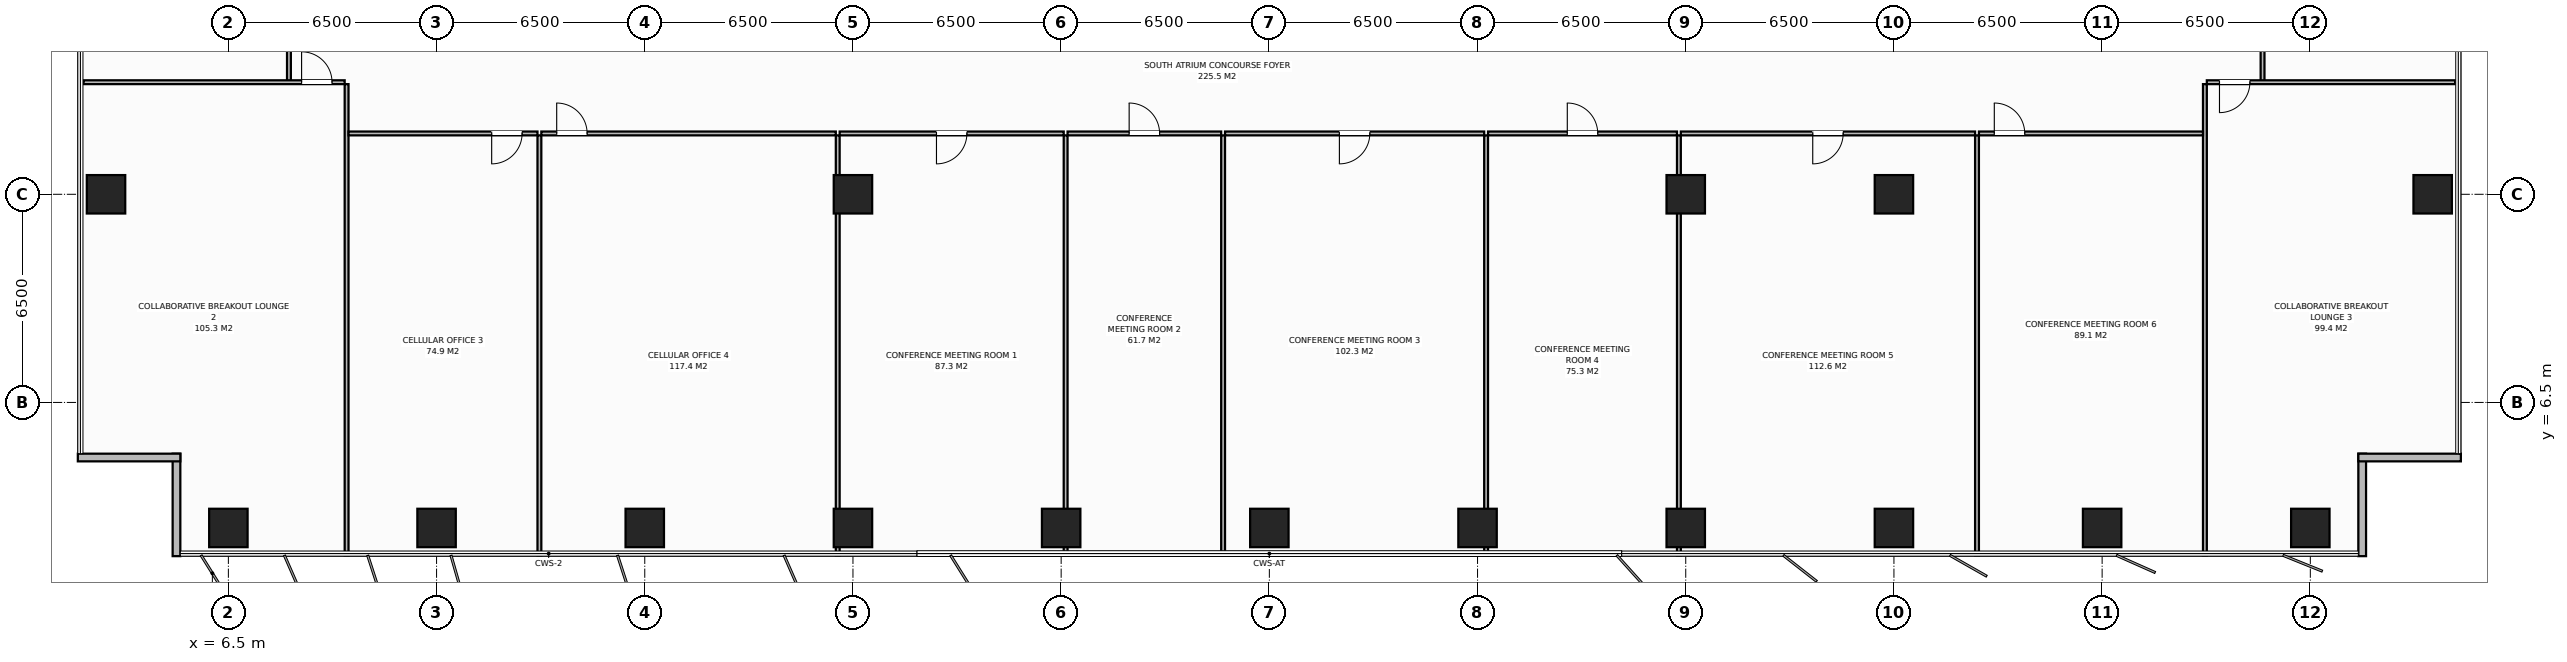
"""IFC4 building model, lengths in metres.
Left out: names, types, materials, properties, quantities, classifications, styles, units other than length and angle.
Written with IfcOpenShell. Run it as: python <this file> out.ifc"""

import sys

from ifc_helpers import new_model, si_unit, direction, frame, frame_2d, origin, origin_2d, place, context, subcontext, project, spatial, rectangle, extrude, element, fill, save


model = new_model("IFC4")
c1 = context("Model", 3, precision=1e-05, world=origin(), true_north=direction((0.0, 1.0)))
c2 = subcontext(c1, "Body", "Model", "MODEL_VIEW")
j1 = project(units=[si_unit("LENGTHUNIT", "METRE"), si_unit("PLANEANGLEUNIT", "RADIAN")], contexts=[c1])
p1 = place(None, origin())
s1 = spatial("IfcSite", under=j1, at=p1, CompositionType="ELEMENT")
p2 = place(p1, origin())
s2 = spatial("IfcBuilding", under=s1, at=p2, CompositionType="ELEMENT")
p3 = place(p2, frame((0.0, 0.0, 131.6)))
s3 = spatial("IfcBuildingStorey", under=s2, at=p3, CompositionType="ELEMENT", Elevation=131.6)
for number, where, z_axis, x_axis in (
    (1, (58.5, 13.0, 0.0), (0.0, 0.0, 1.0), (1.0, 0.0, 0.0)),
    (2, (26.0, 13.0, 0.0), (0.0, 0.0, 1.0), (1.0, 0.0, 0.0)),
    (3, (52.0, 13.0, 0.0), (0.0, 0.0, 1.0), (1.0, 0.0, 0.0)),
    (4, (6.5, 2.58, 0.0), (0.0, 0.0, 1.0), (1.0, 0.0, 0.0)),
    (5, (13.0, 2.58, 0.0), (0.0, 0.0, 1.0), (1.0, 0.0, 0.0)),
    (6, (19.5, 2.58, 0.0), (0.0, 0.0, 1.0), (1.0, 0.0, 0.0)),
    (7, (26.0, 2.58, 0.0), (0.0, 0.0, 1.0), (1.0, 0.0, 0.0)),
    (8, (32.5, 2.58, 0.0), (0.0, 0.0, 1.0), (1.0, 0.0, 0.0)),
    (9, (39.0, 2.58, 0.0), (0.0, 0.0, 1.0), (1.0, 0.0, 0.0)),
    (10, (45.5, 2.58, 0.0), (0.0, 0.0, 1.0), (1.0, 0.0, 0.0)),
    (11, (52.0, 2.58, 0.0), (0.0, 0.0, 1.0), (1.0, 0.0, 0.0)),
    (12, (58.5, 2.58, 0.0), (0.0, 0.0, 1.0), (1.0, 0.0, 0.0)),
    (13, (65.0, 2.58, 0.0), (0.0, 0.0, 1.0), (1.0, 0.0, 0.0)),
    (14, (71.5, 2.58, 0.0), (0.0, 0.0, 1.0), (1.0, 0.0, 0.0)),
    (15, (2.68, 13.0, 0.0), (0.0, 0.0, 1.0), (1.0, 0.0, 0.0)),
    (16, (75.32, 13.0, 0.0), (0.0, 0.0, 1.0), (1.0, 0.0, 0.0)),
):
    element("IfcColumn", number, at=place(p3, frame(where, z_axis=z_axis, x_axis=x_axis)), inside=s3, PredefinedType="COLUMN", context=c2, shape_type="SweptSolid", body=[
        extrude(rectangle(XDim=1.2, YDim=1.2, at=origin_2d()), origin(), (0.0, 0.0, 1.0), 3.8),
    ])
for number, where, z_axis, x_axis in (
    (17, (4.88, 1.7, 0.0), (0.0, 0.0, 1.0), (0.0, 1.0, 0.0)),
    (18, (5.0, 4.78, 0.0), (0.0, 0.0, 1.0), (-1.0, 0.0, 0.0)),
    (19, (73.12, 4.9, 0.0), (0.0, 0.0, 1.0), (0.0, -1.0, 0.0)),
    (20, (76.2, 4.78, 0.0), (0.0, 0.0, 1.0), (-1.0, 0.0, 0.0)),
):
    element("IfcWall", number, at=place(p3, frame(where, z_axis=z_axis, x_axis=x_axis)), inside=s3, PredefinedType="STANDARD", context=c2, shape_type="SweptSolid", body=[
        extrude(rectangle(XDim=3.2, YDim=0.24, at=frame_2d((1.6, 0.0))), origin(), (0.0, 0.0, 1.0), 3.565),
    ])
for number, where, z_axis, x_axis in (
    (21, (8.391, 16.5, 0.0), (0.0, 0.0, 1.0), (0.0, 1.0, 0.0)),
    (22, (70.009, 16.5, 0.0), (0.0, 0.0, 1.0), (0.0, 1.0, 0.0)),
):
    element("IfcWall", number, at=place(p3, frame(where, z_axis=z_axis, x_axis=x_axis)), inside=s3, PredefinedType="PARTITIONING", context=c2, shape_type="SweptSolid", body=[
        extrude(rectangle(XDim=2.1, YDim=0.12, at=frame_2d((1.05, 0.0))), origin(), (0.0, 0.0, 1.0), 3.565),
    ])
p4 = place(p3, frame((10.191, 1.72, 0.0), z_axis=(0.0, 0.0, 1.0), x_axis=(0.0, 1.0, 0.0)))
e23 = element("IfcWall", 23, at=p4, inside=s3, PredefinedType="PARTITIONING", context=c2, shape_type="SweptSolid", body=[
    extrude(rectangle(XDim=14.72, YDim=0.12, at=frame_2d((7.36, 0.0))), origin(), (0.0, 0.0, 1.0), 3.565),
])
p5 = place(p3, frame((1.98, 16.5, 0.0), z_axis=(0.0, 0.0, 1.0), x_axis=(1.0, 0.0, 0.0)))
e24 = element("IfcWall", 24, at=p5, inside=s3, PredefinedType="PARTITIONING", context=c2, shape_type="SweptSolid", body=[
    extrude(rectangle(XDim=8.151, YDim=0.12, at=frame_2d((4.076, 0.0))), origin(), (0.0, 0.0, 1.0), 3.565),
])
p6 = place(p5, frame((6.806, 0.0, 0.0)))
e25 = element("IfcOpeningElement", 25, at=p6, cuts=e24, PredefinedType="OPENING", context=c2, shape_type="SweptSolid", body=[
    extrude(rectangle(XDim=0.95, YDim=2.15, at=frame_2d((0.475, 1.075))), frame((0.0, 0.07, 0.0), z_axis=(0.0, -1.0, 0.0), x_axis=(1.0, 0.0, 0.0)), (0.0, 0.0, 1.0), 0.14),
])
p7 = place(p3, frame((16.21, 1.72, 0.0), z_axis=(0.0, 0.0, 1.0), x_axis=(0.0, 1.0, 0.0)))
e26 = element("IfcWall", 26, at=p7, inside=s3, PredefinedType="PARTITIONING", context=c2, shape_type="SweptSolid", body=[
    extrude(rectangle(XDim=13.12, YDim=0.12, at=frame_2d((6.56, 0.0))), origin(), (0.0, 0.0, 1.0), 3.565),
])
p8 = place(p3, frame((10.251, 14.9, 0.0), z_axis=(0.0, 0.0, 1.0), x_axis=(1.0, 0.0, 0.0)))
e27 = element("IfcWall", 27, at=p8, inside=s3, PredefinedType="PARTITIONING", context=c2, shape_type="SweptSolid", body=[
    extrude(rectangle(XDim=5.899, YDim=0.12, at=frame_2d((2.95, 0.0))), origin(), (0.0, 0.0, 1.0), 3.565),
])
p9 = place(p8, frame((4.469, 0.0, 0.0)))
e28 = element("IfcOpeningElement", 28, at=p9, cuts=e27, PredefinedType="OPENING", context=c2, shape_type="SweptSolid", body=[
    extrude(rectangle(XDim=0.95, YDim=2.15, at=frame_2d((0.475, 1.075))), frame((0.0, 0.07, 0.0), z_axis=(0.0, -1.0, 0.0), x_axis=(1.0, 0.0, 0.0)), (0.0, 0.0, 1.0), 0.14),
])
p10 = place(p3, frame((25.525, 1.72, 0.0), z_axis=(0.0, 0.0, 1.0), x_axis=(0.0, 1.0, 0.0)))
e29 = element("IfcWall", 29, at=p10, inside=s3, PredefinedType="PARTITIONING", context=c2, shape_type="SweptSolid", body=[
    extrude(rectangle(XDim=13.12, YDim=0.12, at=frame_2d((6.56, 0.0))), origin(), (0.0, 0.0, 1.0), 3.565),
])
p11 = place(p3, frame((16.271, 14.9, 0.0), z_axis=(0.0, 0.0, 1.0), x_axis=(1.0, 0.0, 0.0)))
e30 = element("IfcWall", 30, at=p11, inside=s3, PredefinedType="PARTITIONING", context=c2, shape_type="SweptSolid", body=[
    extrude(rectangle(XDim=9.194, YDim=0.12, at=frame_2d((4.597, 0.0))), origin(), (0.0, 0.0, 1.0), 3.565),
])
p12 = place(p11, frame((0.48, 0.0, 0.0)))
e31 = element("IfcOpeningElement", 31, at=p12, cuts=e30, PredefinedType="OPENING", context=c2, shape_type="SweptSolid", body=[
    extrude(rectangle(XDim=0.95, YDim=2.15, at=frame_2d((0.475, 1.075))), frame((0.0, 0.07, 0.0), z_axis=(0.0, -1.0, 0.0), x_axis=(1.0, 0.0, 0.0)), (0.0, 0.0, 1.0), 0.14),
])
p13 = place(p3, frame((32.64, 1.72, 0.0), z_axis=(0.0, 0.0, 1.0), x_axis=(0.0, 1.0, 0.0)))
e32 = element("IfcWall", 32, at=p13, inside=s3, PredefinedType="PARTITIONING", context=c2, shape_type="SweptSolid", body=[
    extrude(rectangle(XDim=13.12, YDim=0.12, at=frame_2d((6.56, 0.0))), origin(), (0.0, 0.0, 1.0), 2.965),
])
p14 = place(p3, frame((25.585, 14.9, 0.0), z_axis=(0.0, 0.0, 1.0), x_axis=(1.0, 0.0, 0.0)))
e33 = element("IfcWall", 33, at=p14, inside=s3, PredefinedType="PARTITIONING", context=c2, shape_type="SweptSolid", body=[
    extrude(rectangle(XDim=6.995, YDim=0.12, at=frame_2d((3.498, 0.0))), origin(), (0.0, 0.0, 1.0), 3.565),
])
p15 = place(p14, frame((3.023, 0.0, 0.0)))
e34 = element("IfcOpeningElement", 34, at=p15, cuts=e33, PredefinedType="OPENING", context=c2, shape_type="SweptSolid", body=[
    extrude(rectangle(XDim=0.95, YDim=2.15, at=frame_2d((0.475, 1.075))), frame((0.0, 0.07, 0.0), z_axis=(0.0, -1.0, 0.0), x_axis=(1.0, 0.0, 0.0)), (0.0, 0.0, 1.0), 0.14),
])
p16 = place(p3, frame((37.556, 1.72, 0.0), z_axis=(0.0, 0.0, 1.0), x_axis=(0.0, 1.0, 0.0)))
e35 = element("IfcWall", 35, at=p16, inside=s3, PredefinedType="PARTITIONING", context=c2, shape_type="SweptSolid", body=[
    extrude(rectangle(XDim=13.12, YDim=0.12, at=frame_2d((6.56, 0.0))), origin(), (0.0, 0.0, 1.0), 3.565),
])
p17 = place(p3, frame((32.7, 14.9, 0.0), z_axis=(0.0, 0.0, 1.0), x_axis=(1.0, 0.0, 0.0)))
e36 = element("IfcWall", 36, at=p17, inside=s3, PredefinedType="PARTITIONING", context=c2, shape_type="SweptSolid", body=[
    extrude(rectangle(XDim=4.796, YDim=0.12, at=frame_2d((2.398, 0.0))), origin(), (0.0, 0.0, 1.0), 3.565),
])
p18 = place(p17, frame((1.923, 0.0, 0.0)))
e37 = element("IfcOpeningElement", 37, at=p18, cuts=e36, PredefinedType="OPENING", context=c2, shape_type="SweptSolid", body=[
    extrude(rectangle(XDim=0.95, YDim=2.15, at=frame_2d((0.475, 1.075))), frame((0.0, 0.07, 0.0), z_axis=(0.0, -1.0, 0.0), x_axis=(1.0, 0.0, 0.0)), (0.0, 0.0, 1.0), 0.14),
])
p19 = place(p3, frame((45.767, 1.72, 0.0), z_axis=(0.0, 0.0, 1.0), x_axis=(0.0, 1.0, 0.0)))
e38 = element("IfcWall", 38, at=p19, inside=s3, PredefinedType="PARTITIONING", context=c2, shape_type="SweptSolid", body=[
    extrude(rectangle(XDim=13.12, YDim=0.12, at=frame_2d((6.56, 0.0))), origin(), (0.0, 0.0, 1.0), 3.565),
])
p20 = place(p3, frame((37.616, 14.9, 0.0), z_axis=(0.0, 0.0, 1.0), x_axis=(1.0, 0.0, 0.0)))
e39 = element("IfcWall", 39, at=p20, inside=s3, PredefinedType="PARTITIONING", context=c2, shape_type="SweptSolid", body=[
    extrude(rectangle(XDim=8.091, YDim=0.12, at=frame_2d((4.045, 0.0))), origin(), (0.0, 0.0, 1.0), 3.565),
])
p21 = place(p20, frame((3.571, 0.0, 0.0)))
e40 = element("IfcOpeningElement", 40, at=p21, cuts=e39, PredefinedType="OPENING", context=c2, shape_type="SweptSolid", body=[
    extrude(rectangle(XDim=0.95, YDim=2.15, at=frame_2d((0.475, 1.075))), frame((0.0, 0.07, 0.0), z_axis=(0.0, -1.0, 0.0), x_axis=(1.0, 0.0, 0.0)), (0.0, 0.0, 1.0), 0.14),
])
p22 = place(p3, frame((51.787, 1.72, 0.0), z_axis=(0.0, 0.0, 1.0), x_axis=(0.0, 1.0, 0.0)))
e41 = element("IfcWall", 41, at=p22, inside=s3, PredefinedType="PARTITIONING", context=c2, shape_type="SweptSolid", body=[
    extrude(rectangle(XDim=13.12, YDim=0.12, at=frame_2d((6.56, 0.0))), origin(), (0.0, 0.0, 1.0), 2.965),
])
p23 = place(p3, frame((45.827, 14.9, 0.0), z_axis=(0.0, 0.0, 1.0), x_axis=(1.0, 0.0, 0.0)))
e42 = element("IfcWall", 42, at=p23, inside=s3, PredefinedType="PARTITIONING", context=c2, shape_type="SweptSolid", body=[
    extrude(rectangle(XDim=5.899, YDim=0.12, at=frame_2d((2.95, 0.0))), origin(), (0.0, 0.0, 1.0), 3.565),
])
p24 = place(p23, frame((2.475, 0.0, 0.0)))
e43 = element("IfcOpeningElement", 43, at=p24, cuts=e42, PredefinedType="OPENING", context=c2, shape_type="SweptSolid", body=[
    extrude(rectangle(XDim=0.95, YDim=2.15, at=frame_2d((0.475, 1.075))), frame((0.0, 0.07, 0.0), z_axis=(0.0, -1.0, 0.0), x_axis=(1.0, 0.0, 0.0)), (0.0, 0.0, 1.0), 0.14),
])
p25 = place(p3, frame((61.094, 1.72, 0.0), z_axis=(0.0, 0.0, 1.0), x_axis=(0.0, 1.0, 0.0)))
e44 = element("IfcWall", 44, at=p25, inside=s3, PredefinedType="PARTITIONING", context=c2, shape_type="SweptSolid", body=[
    extrude(rectangle(XDim=13.12, YDim=0.12, at=frame_2d((6.56, 0.0))), origin(), (0.0, 0.0, 1.0), 3.565),
])
p26 = place(p3, frame((51.847, 14.9, 0.0), z_axis=(0.0, 0.0, 1.0), x_axis=(1.0, 0.0, 0.0)))
e45 = element("IfcWall", 45, at=p26, inside=s3, PredefinedType="PARTITIONING", context=c2, shape_type="SweptSolid", body=[
    extrude(rectangle(XDim=9.187, YDim=0.12, at=frame_2d((4.593, 0.0))), origin(), (0.0, 0.0, 1.0), 3.565),
])
p27 = place(p26, frame((4.118, 0.0, 0.0)))
e46 = element("IfcOpeningElement", 46, at=p27, cuts=e45, PredefinedType="OPENING", context=c2, shape_type="SweptSolid", body=[
    extrude(rectangle(XDim=0.95, YDim=2.15, at=frame_2d((0.475, 1.075))), frame((0.0, 0.07, 0.0), z_axis=(0.0, -1.0, 0.0), x_axis=(1.0, 0.0, 0.0)), (0.0, 0.0, 1.0), 0.14),
])
p28 = place(p3, frame((68.209, 1.72, 0.0), z_axis=(0.0, 0.0, 1.0), x_axis=(0.0, 1.0, 0.0)))
e47 = element("IfcWall", 47, at=p28, inside=s3, PredefinedType="PARTITIONING", context=c2, shape_type="SweptSolid", body=[
    extrude(rectangle(XDim=14.72, YDim=0.12, at=frame_2d((7.36, 0.0))), origin(), (0.0, 0.0, 1.0), 3.565),
])
p29 = place(p3, frame((61.154, 14.9, 0.0), z_axis=(0.0, 0.0, 1.0), x_axis=(1.0, 0.0, 0.0)))
e48 = element("IfcWall", 48, at=p29, inside=s3, PredefinedType="PARTITIONING", context=c2, shape_type="SweptSolid", body=[
    extrude(rectangle(XDim=6.995, YDim=0.12, at=frame_2d((3.498, 0.0))), origin(), (0.0, 0.0, 1.0), 3.565),
])
p30 = place(p29, frame((0.48, 0.0, 0.0)))
e49 = element("IfcOpeningElement", 49, at=p30, cuts=e48, PredefinedType="OPENING", context=c2, shape_type="SweptSolid", body=[
    extrude(rectangle(XDim=0.95, YDim=2.15, at=frame_2d((0.475, 1.075))), frame((0.0, 0.07, 0.0), z_axis=(0.0, -1.0, 0.0), x_axis=(1.0, 0.0, 0.0)), (0.0, 0.0, 1.0), 0.14),
])
p31 = place(p3, frame((68.269, 16.5, 0.0), z_axis=(0.0, 0.0, 1.0), x_axis=(1.0, 0.0, 0.0)))
e50 = element("IfcWall", 50, at=p31, inside=s3, PredefinedType="PARTITIONING", context=c2, shape_type="SweptSolid", body=[
    extrude(rectangle(XDim=7.751, YDim=0.12, at=frame_2d((3.875, 0.0))), origin(), (0.0, 0.0, 1.0), 3.565),
])
p32 = place(p31, frame((0.395, 0.0, 0.0)))
e51 = element("IfcOpeningElement", 51, at=p32, cuts=e50, PredefinedType="OPENING", context=c2, shape_type="SweptSolid", body=[
    extrude(rectangle(XDim=0.95, YDim=2.15, at=frame_2d((0.475, 1.075))), frame((0.0, 0.07, 0.0), z_axis=(0.0, -1.0, 0.0), x_axis=(1.0, 0.0, 0.0)), (0.0, 0.0, 1.0), 0.14),
])
p33 = place(p6, origin())
e52 = element("IfcDoor", 52, at=p33, inside=s3, OperationType="SINGLE_SWING_LEFT", PredefinedType="DOOR", context=c2, shape_type="SweptSolid", body=[
    extrude(rectangle(XDim=0.95, YDim=2.15, at=frame_2d((0.475, 1.075))), frame((0.0, 0.025, 0.0), z_axis=(0.0, -1.0, 0.0), x_axis=(1.0, 0.0, 0.0)), (0.0, 0.0, 1.0), 0.05),
])
fill(e25, e52)
p34 = place(p9, origin())
e53 = element("IfcDoor", 53, at=p34, inside=s3, OperationType="SINGLE_SWING_RIGHT", PredefinedType="DOOR", context=c2, shape_type="SweptSolid", body=[
    extrude(rectangle(XDim=0.95, YDim=2.15, at=frame_2d((0.475, 1.075))), frame((0.0, 0.025, 0.0), z_axis=(0.0, -1.0, 0.0), x_axis=(1.0, 0.0, 0.0)), (0.0, 0.0, 1.0), 0.05),
])
fill(e28, e53)
p35 = place(p12, origin())
e54 = element("IfcDoor", 54, at=p35, inside=s3, OperationType="SINGLE_SWING_LEFT", PredefinedType="DOOR", context=c2, shape_type="SweptSolid", body=[
    extrude(rectangle(XDim=0.95, YDim=2.15, at=frame_2d((0.475, 1.075))), frame((0.0, 0.025, 0.0), z_axis=(0.0, -1.0, 0.0), x_axis=(1.0, 0.0, 0.0)), (0.0, 0.0, 1.0), 0.05),
])
fill(e31, e54)
p36 = place(p15, origin())
e55 = element("IfcDoor", 55, at=p36, inside=s3, OperationType="SINGLE_SWING_RIGHT", PredefinedType="DOOR", context=c2, shape_type="SweptSolid", body=[
    extrude(rectangle(XDim=0.95, YDim=2.15, at=frame_2d((0.475, 1.075))), frame((0.0, 0.025, 0.0), z_axis=(0.0, -1.0, 0.0), x_axis=(1.0, 0.0, 0.0)), (0.0, 0.0, 1.0), 0.05),
])
fill(e34, e55)
p37 = place(p18, origin())
e56 = element("IfcDoor", 56, at=p37, inside=s3, OperationType="SINGLE_SWING_LEFT", PredefinedType="DOOR", context=c2, shape_type="SweptSolid", body=[
    extrude(rectangle(XDim=0.95, YDim=2.15, at=frame_2d((0.475, 1.075))), frame((0.0, 0.025, 0.0), z_axis=(0.0, -1.0, 0.0), x_axis=(1.0, 0.0, 0.0)), (0.0, 0.0, 1.0), 0.05),
])
fill(e37, e56)
p38 = place(p21, origin())
e57 = element("IfcDoor", 57, at=p38, inside=s3, OperationType="SINGLE_SWING_RIGHT", PredefinedType="DOOR", context=c2, shape_type="SweptSolid", body=[
    extrude(rectangle(XDim=0.95, YDim=2.15, at=frame_2d((0.475, 1.075))), frame((0.0, 0.025, 0.0), z_axis=(0.0, -1.0, 0.0), x_axis=(1.0, 0.0, 0.0)), (0.0, 0.0, 1.0), 0.05),
])
fill(e40, e57)
p39 = place(p24, origin())
e58 = element("IfcDoor", 58, at=p39, inside=s3, OperationType="SINGLE_SWING_LEFT", PredefinedType="DOOR", context=c2, shape_type="SweptSolid", body=[
    extrude(rectangle(XDim=0.95, YDim=2.15, at=frame_2d((0.475, 1.075))), frame((0.0, 0.025, 0.0), z_axis=(0.0, -1.0, 0.0), x_axis=(1.0, 0.0, 0.0)), (0.0, 0.0, 1.0), 0.05),
])
fill(e43, e58)
p40 = place(p27, origin())
e59 = element("IfcDoor", 59, at=p40, inside=s3, OperationType="SINGLE_SWING_RIGHT", PredefinedType="DOOR", context=c2, shape_type="SweptSolid", body=[
    extrude(rectangle(XDim=0.95, YDim=2.15, at=frame_2d((0.475, 1.075))), frame((0.0, 0.025, 0.0), z_axis=(0.0, -1.0, 0.0), x_axis=(1.0, 0.0, 0.0)), (0.0, 0.0, 1.0), 0.05),
])
fill(e46, e59)
p41 = place(p30, origin())
e60 = element("IfcDoor", 60, at=p41, inside=s3, OperationType="SINGLE_SWING_LEFT", PredefinedType="DOOR", context=c2, shape_type="SweptSolid", body=[
    extrude(rectangle(XDim=0.95, YDim=2.15, at=frame_2d((0.475, 1.075))), frame((0.0, 0.025, 0.0), z_axis=(0.0, -1.0, 0.0), x_axis=(1.0, 0.0, 0.0)), (0.0, 0.0, 1.0), 0.05),
])
fill(e49, e60)
p42 = place(p32, origin())
e61 = element("IfcDoor", 61, at=p42, inside=s3, OperationType="SINGLE_SWING_RIGHT", PredefinedType="DOOR", context=c2, shape_type="SweptSolid", body=[
    extrude(rectangle(XDim=0.95, YDim=2.15, at=frame_2d((0.475, 1.075))), frame((0.0, 0.025, 0.0), z_axis=(0.0, -1.0, 0.0), x_axis=(1.0, 0.0, 0.0)), (0.0, 0.0, 1.0), 0.05),
])
fill(e51, e61)
save(model, sys.argv[1])
